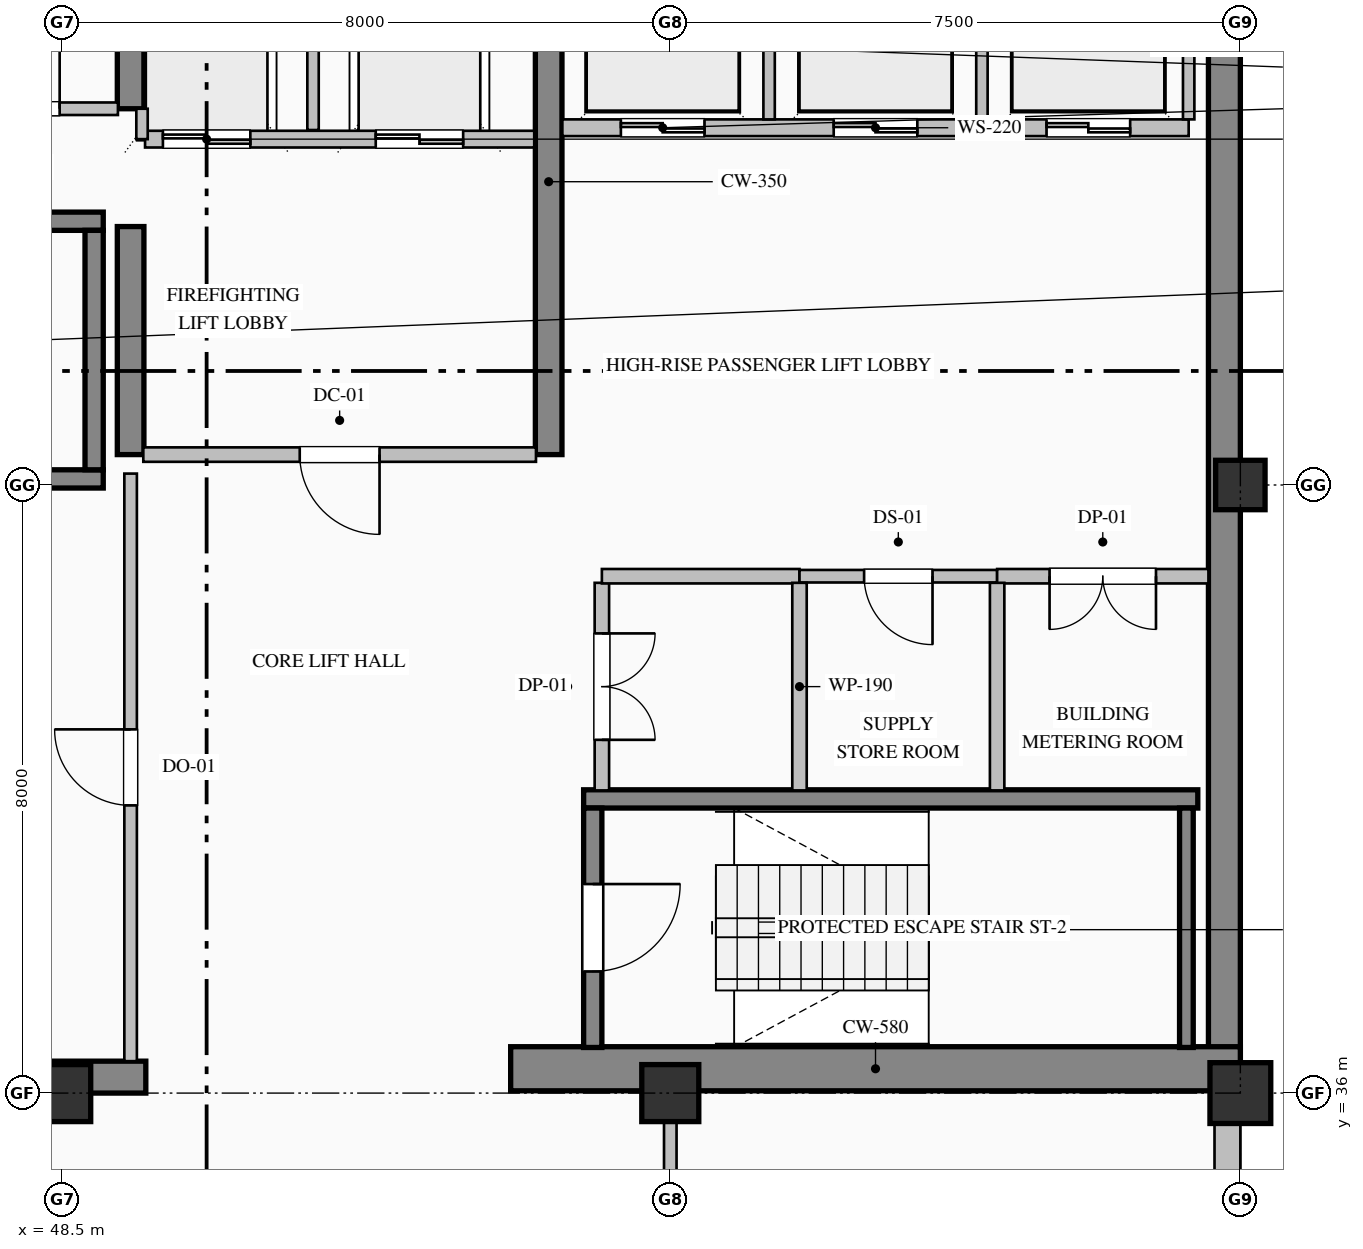
"""IFC4 building model, lengths in metres.
Left out: names, types, materials, properties, quantities, classifications, styles, units other than length and angle.
Written with IfcOpenShell. Run it as: python <this file> out.ifc"""

import sys

from ifc_helpers import new_model, si_unit, direction, frame, frame_2d, origin, origin_2d, place, context, subcontext, project, spatial, rectangle, hollow_rectangle, extrude, element, fill, save


model = new_model("IFC4")
c1 = context("Model", 3, precision=1e-05, world=origin(), true_north=direction((0.0, 1.0)))
c2 = subcontext(c1, "Body", "Model", "MODEL_VIEW")
j1 = project(units=[si_unit("LENGTHUNIT", "METRE"), si_unit("PLANEANGLEUNIT", "RADIAN")], contexts=[c1])
p1 = place(None, origin())
s1 = spatial("IfcSite", under=j1, at=p1, CompositionType="ELEMENT")
p2 = place(p1, origin())
s2 = spatial("IfcBuilding", under=s1, at=p2, CompositionType="ELEMENT")
p3 = place(p2, frame((0.0, 0.0, 339.2)))
s3 = spatial("IfcBuildingStorey", under=s2, at=p3, CompositionType="ELEMENT", Elevation=339.2)
p4 = place(p3, frame((63.79, 36.32, 0.0), z_axis=(0.0, 0.0, 1.0), x_axis=(0.0, 1.0, 0.0)))
e1 = element("IfcWall", 1, at=p4, inside=s3, PredefinedType="SHEAR", context=c2, shape_type="SweptSolid", body=[
    extrude(rectangle(XDim=15.26, YDim=0.42, at=frame_2d((7.63, 0.0))), origin(), (0.0, 0.0, 1.0), 3.785),
])
p5 = place(p3, frame((40.5, 36.21, 0.0), z_axis=(0.0, 0.0, 1.0), x_axis=(1.0, 0.0, 0.0)))
e2 = element("IfcWall", 2, at=p5, inside=s3, PredefinedType="SHEAR", context=c2, shape_type="SweptSolid", body=[
    extrude(rectangle(XDim=9.1, YDim=0.42, at=frame_2d((4.55, 0.0))), origin(), (0.0, 0.0, 1.0), 3.785),
])
p6 = place(p3, frame((54.4, 36.32, 0.0), z_axis=(0.0, 0.0, 1.0), x_axis=(1.0, 0.0, 0.0)))
e3 = element("IfcWall", 3, at=p6, inside=s3, PredefinedType="SHEAR", context=c2, shape_type="SweptSolid", body=[
    extrude(rectangle(XDim=9.6, YDim=0.58, at=frame_2d((4.8, 0.0))), origin(), (0.0, 0.0, 1.0), 4.0),
])
p7 = place(p3, frame((49.4, 44.4, 0.0), z_axis=(0.0, 0.0, 1.0), x_axis=(0.0, 1.0, 0.0)))
e4 = element("IfcWall", 4, at=p7, inside=s3, PredefinedType="SHEAR", context=c2, shape_type="SweptSolid", body=[
    extrude(rectangle(XDim=3.0, YDim=0.35, at=frame_2d((1.5, 0.0))), origin(), (0.0, 0.0, 1.0), 3.785),
])
p8 = place(p3, frame((49.4, 48.95, 0.0), z_axis=(0.0, 0.0, 1.0), x_axis=(0.0, 1.0, 0.0)))
e5 = element("IfcWall", 5, at=p8, inside=s3, PredefinedType="SHEAR", context=c2, shape_type="SweptSolid", body=[
    extrude(rectangle(XDim=2.63, YDim=0.35, at=frame_2d((1.315, 0.0))), origin(), (0.0, 0.0, 1.0), 3.785),
])
p9 = place(p3, frame((54.9, 44.4, 0.0), z_axis=(0.0, 0.0, 1.0), x_axis=(0.0, 1.0, 0.0)))
e6 = element("IfcWall", 6, at=p9, inside=s3, PredefinedType="SHEAR", context=c2, shape_type="SweptSolid", body=[
    extrude(rectangle(XDim=7.18, YDim=0.35, at=frame_2d((3.59, 0.0))), origin(), (0.0, 0.0, 1.0), 3.785),
])
for number, where, z_axis, x_axis in (
    (7, (48.5, 36.0, 0.0), (0.0, 0.0, 1.0), (1.0, 0.0, 0.0)),
    (8, (56.5, 36.0, 0.0), (0.0, 0.0, 1.0), (1.0, 0.0, 0.0)),
):
    element("IfcColumn", number, at=place(p3, frame(where, z_axis=z_axis, x_axis=x_axis)), inside=s3, PredefinedType="COLUMN", context=c2, shape_type="SweptSolid", body=[
        extrude(rectangle(XDim=0.75, YDim=0.75, at=origin_2d()), origin(), (0.0, 0.0, 1.0), 4.0),
    ])
p10 = place(p3, frame((64.0, 36.0, 0.0), z_axis=(0.0, 0.0, 1.0), x_axis=(1.0, 0.0, 0.0)))
e9 = element("IfcColumn", 9, at=p10, inside=s3, PredefinedType="COLUMN", context=c2, shape_type="SweptSolid", body=[
    extrude(hollow_rectangle(XDim=0.8, YDim=0.8, WallThickness=0.032, at=origin_2d()), origin(), (0.0, 0.0, 1.0), 4.0),
])
p11 = place(p3, frame((64.0, 44.0, 0.0), z_axis=(0.0, 0.0, 1.0), x_axis=(1.0, 0.0, 0.0)))
e10 = element("IfcColumn", 10, at=p11, inside=s3, PredefinedType="COLUMN", context=c2, shape_type="SweptSolid", body=[
    extrude(hollow_rectangle(XDim=0.65, YDim=0.65, WallThickness=0.028, at=origin_2d()), origin(), (0.0, 0.0, 1.0), 4.0),
])
p12 = place(p3, frame((63.83, 36.05, 0.0), z_axis=(0.0, 0.0, 1.0), x_axis=(0.0, -1.0, 0.0)))
e11 = element("IfcWall", 11, at=p12, inside=s3, PredefinedType="SOLIDWALL", context=c2, shape_type="SweptSolid", body=[
    extrude(rectangle(XDim=13.55, YDim=0.34, at=frame_2d((6.775, 0.0))), origin(), (0.0, 0.0, 1.0), 3.335),
])
p13 = place(p12, frame((3.075, 0.0, 0.8)))
e12 = element("IfcOpeningElement", 12, at=p13, cuts=e11, PredefinedType="OPENING", context=c2, shape_type="SweptSolid", body=[
    extrude(rectangle(XDim=1.05, YDim=2.15, at=frame_2d((0.525, 1.075))), frame((0.0, 0.18, 0.0), z_axis=(0.0, -1.0, 0.0), x_axis=(1.0, 0.0, 0.0)), (0.0, 0.0, 1.0), 0.36),
])
for number, where, z_axis, x_axis in (
    (13, (40.96, 47.47, 0.0), (0.0, 0.0, 1.0), (1.0, 0.0, 0.0)),
    (14, (49.04, 44.08, 0.0), (0.0, 0.0, 1.0), (-1.0, 0.0, 0.0)),
):
    element("IfcWall", number, at=place(p3, frame(where, z_axis=z_axis, x_axis=x_axis)), inside=s3, PredefinedType="SOLIDWALL", context=c2, shape_type="SweptSolid", body=[
        extrude(rectangle(XDim=8.08, YDim=0.24, at=frame_2d((4.04, 0.0))), origin(), (0.0, 0.0, 1.0), 4.0),
    ])
p14 = place(p3, frame((48.92, 44.2, 0.0), z_axis=(0.0, 0.0, 1.0), x_axis=(0.0, 1.0, 0.0)))
e15 = element("IfcWall", 15, at=p14, inside=s3, PredefinedType="SOLIDWALL", context=c2, shape_type="SweptSolid", body=[
    extrude(rectangle(XDim=3.15, YDim=0.24, at=frame_2d((1.575, 0.0))), origin(), (0.0, 0.0, 1.0), 4.0),
])
p15 = place(p3, frame((55.36, 39.87, 0.0), z_axis=(0.0, 0.0, 1.0), x_axis=(1.0, 0.0, 0.0)))
e16 = element("IfcWall", 16, at=p15, inside=s3, PredefinedType="SOLIDWALL", context=c2, shape_type="SweptSolid", body=[
    extrude(rectangle(XDim=8.08, YDim=0.24, at=frame_2d((4.04, 0.0))), origin(), (0.0, 0.0, 1.0), 4.0),
])
p16 = place(p3, frame((55.48, 39.75, 0.0), z_axis=(0.0, 0.0, 1.0), x_axis=(0.0, -1.0, 0.0)))
e17 = element("IfcWall", 17, at=p16, inside=s3, PredefinedType="SOLIDWALL", context=c2, shape_type="SweptSolid", body=[
    extrude(rectangle(XDim=3.15, YDim=0.24, at=frame_2d((1.575, 0.0))), origin(), (0.0, 0.0, 1.0), 4.0),
])
p17 = place(p16, frame((1.0, 0.0, 0.0)))
e18 = element("IfcOpeningElement", 18, at=p17, cuts=e17, PredefinedType="OPENING", context=c2, shape_type="SweptSolid", body=[
    extrude(rectangle(XDim=1.15, YDim=2.2, at=frame_2d((0.575, 1.1))), frame((0.0, 0.13, 0.0), z_axis=(0.0, -1.0, 0.0), x_axis=(1.0, 0.0, 0.0)), (0.0, 0.0, 1.0), 0.26),
])
p18 = place(p3, frame((63.29, 36.6, 0.0), z_axis=(0.0, 0.0, 1.0), x_axis=(0.0, 1.0, 0.0)))
e19 = element("IfcWall", 19, at=p18, inside=s3, PredefinedType="SOLIDWALL", context=c2, shape_type="SweptSolid", body=[
    extrude(rectangle(XDim=3.15, YDim=0.18, at=frame_2d((1.575, 0.0))), origin(), (0.0, 0.0, 1.0), 4.0),
])
p19 = place(p3, frame((54.71, 48.55, 0.0), z_axis=(0.0, 0.0, 1.0), x_axis=(-1.0, 0.0, 0.0)))
e20 = element("IfcWall", 20, at=p19, inside=s3, PredefinedType="PARTITIONING", context=c2, shape_type="SweptSolid", body=[
    extrude(rectangle(XDim=5.12, YDim=0.22, at=frame_2d((2.56, 0.0))), origin(), (0.0, 0.0, 1.0), 3.785),
])
p20 = place(p19, frame((3.735, 0.0, 0.0)))
e21 = element("IfcOpeningElement", 21, at=p20, cuts=e20, PredefinedType="OPENING", context=c2, shape_type="SweptSolid", body=[
    extrude(rectangle(XDim=1.15, YDim=2.2, at=frame_2d((0.575, 1.1))), frame((0.0, 0.12, 0.0), z_axis=(0.0, -1.0, 0.0), x_axis=(1.0, 0.0, 0.0)), (0.0, 0.0, 1.0), 0.24),
])
p21 = place(p19, frame((0.935, 0.0, 0.0)))
e22 = element("IfcOpeningElement", 22, at=p21, cuts=e20, PredefinedType="OPENING", context=c2, shape_type="SweptSolid", body=[
    extrude(rectangle(XDim=1.15, YDim=2.2, at=frame_2d((0.575, 1.1))), frame((0.0, 0.12, 0.0), z_axis=(0.0, -1.0, 0.0), x_axis=(1.0, 0.0, 0.0)), (0.0, 0.0, 1.0), 0.24),
])
p22 = place(p3, frame((51.8, 48.67, 0.0), z_axis=(0.0, 0.0, 1.0), x_axis=(0.0, 1.0, 0.0)))
e23 = element("IfcWall", 23, at=p22, inside=s3, PredefinedType="PARTITIONING", context=c2, shape_type="SweptSolid", body=[
    extrude(rectangle(XDim=2.91, YDim=0.15, at=frame_2d((1.455, 0.0))), origin(), (0.0, 0.0, 1.0), 3.785),
])
p23 = place(p3, frame((49.55, 48.55, 0.0), z_axis=(0.0, 0.0, 1.0), x_axis=(0.0, 1.0, 0.0)))
e24 = element("IfcWall", 24, at=p23, inside=s3, PredefinedType="PARTITIONING", context=c2, shape_type="SweptSolid", body=[
    extrude(rectangle(XDim=0.4, YDim=0.15, at=frame_2d((0.2, 0.0))), origin(), (0.0, 0.0, 1.0), 3.785),
])
p24 = place(p3, frame((63.32, 48.7, 0.0), z_axis=(0.0, 0.0, 1.0), x_axis=(-1.0, 0.0, 0.0)))
e25 = element("IfcWall", 25, at=p24, inside=s3, PredefinedType="PARTITIONING", context=c2, shape_type="SweptSolid", body=[
    extrude(rectangle(XDim=8.24, YDim=0.22, at=frame_2d((4.12, 0.0))), origin(), (0.0, 0.0, 1.0), 3.785),
])
p25 = place(p24, frame((6.37, 0.0, 0.0)))
e26 = element("IfcOpeningElement", 26, at=p25, cuts=e25, PredefinedType="OPENING", context=c2, shape_type="SweptSolid", body=[
    extrude(rectangle(XDim=1.1, YDim=2.2, at=frame_2d((0.55, 1.1))), frame((0.0, 0.12, 0.0), z_axis=(0.0, -1.0, 0.0), x_axis=(1.0, 0.0, 0.0)), (0.0, 0.0, 1.0), 0.24),
])
p26 = place(p24, frame((3.57, 0.0, 0.0)))
e27 = element("IfcOpeningElement", 27, at=p26, cuts=e25, PredefinedType="OPENING", context=c2, shape_type="SweptSolid", body=[
    extrude(rectangle(XDim=1.1, YDim=2.2, at=frame_2d((0.55, 1.1))), frame((0.0, 0.12, 0.0), z_axis=(0.0, -1.0, 0.0), x_axis=(1.0, 0.0, 0.0)), (0.0, 0.0, 1.0), 0.24),
])
p27 = place(p24, frame((0.77, 0.0, 0.0)))
e28 = element("IfcOpeningElement", 28, at=p27, cuts=e25, PredefinedType="OPENING", context=c2, shape_type="SweptSolid", body=[
    extrude(rectangle(XDim=1.1, YDim=2.2, at=frame_2d((0.55, 1.1))), frame((0.0, 0.12, 0.0), z_axis=(0.0, -1.0, 0.0), x_axis=(1.0, 0.0, 0.0)), (0.0, 0.0, 1.0), 0.24),
])
for number, where, z_axis, x_axis in (
    (29, (57.8, 48.81, 0.0), (0.0, 0.0, 1.0), (0.0, 1.0, 0.0)),
    (30, (60.6, 48.81, 0.0), (0.0, 0.0, 1.0), (0.0, 1.0, 0.0)),
    (31, (63.32, 48.81, 0.0), (0.0, 0.0, 1.0), (0.0, 1.0, 0.0)),
):
    element("IfcWall", number, at=place(p3, frame(where, z_axis=z_axis, x_axis=x_axis)), inside=s3, PredefinedType="PARTITIONING", context=c2, shape_type="SweptSolid", body=[
        extrude(rectangle(XDim=2.77, YDim=0.15, at=frame_2d((1.385, 0.0))), origin(), (0.0, 0.0, 1.0), 3.785),
    ])
p28 = place(p3, frame((46.8, 48.95, 0.0), z_axis=(0.0, 0.0, 1.0), x_axis=(1.0, 0.0, 0.0)))
e32 = element("IfcWall", 32, at=p28, inside=s3, PredefinedType="PARTITIONING", context=c2, shape_type="SweptSolid", body=[
    extrude(rectangle(XDim=2.433, YDim=0.165, at=frame_2d((1.216, 0.0))), origin(), (0.0, 0.0, 1.0), 3.785),
])
p29 = place(p28, frame((0.767, 0.0, 0.0)))
e33 = element("IfcOpeningElement", 33, at=p29, cuts=e32, PredefinedType="OPENING", context=c2, shape_type="SweptSolid", body=[
    extrude(rectangle(XDim=0.9, YDim=2.15, at=frame_2d((0.45, 1.075))), frame((0.0, 0.093, 0.0), z_axis=(0.0, -1.0, 0.0), x_axis=(1.0, 0.0, 0.0)), (0.0, 0.0, 1.0), 0.185),
])
p30 = place(p3, frame((54.733, 44.4, 0.0), z_axis=(0.0, 0.0, 1.0), x_axis=(-1.0, 0.0, 0.0)))
e34 = element("IfcWall", 34, at=p30, inside=s3, PredefinedType="PARTITIONING", context=c2, shape_type="SweptSolid", body=[
    extrude(rectangle(XDim=5.166, YDim=0.19, at=frame_2d((2.583, 0.0))), origin(), (0.0, 0.0, 1.0), 3.785),
])
p31 = place(p30, frame((2.058, 0.0, 0.0)))
e35 = element("IfcOpeningElement", 35, at=p31, cuts=e34, PredefinedType="OPENING", context=c2, shape_type="SweptSolid", body=[
    extrude(rectangle(XDim=1.05, YDim=2.15, at=frame_2d((0.525, 1.075))), frame((0.0, 0.105, 0.0), z_axis=(0.0, -1.0, 0.0), x_axis=(1.0, 0.0, 0.0)), (0.0, 0.0, 1.0), 0.21),
])
p32 = place(p3, frame((49.4, 36.42, 0.0), z_axis=(0.0, 0.0, 1.0), x_axis=(0.0, 1.0, 0.0)))
e36 = element("IfcWall", 36, at=p32, inside=s3, PredefinedType="PARTITIONING", context=c2, shape_type="SweptSolid", body=[
    extrude(rectangle(XDim=7.73, YDim=0.165, at=frame_2d((3.865, 0.0))), origin(), (0.0, 0.0, 1.0), 3.027),
])
p33 = place(p32, frame((3.365, 0.0, 0.0)))
e37 = element("IfcOpeningElement", 37, at=p33, cuts=e36, PredefinedType="OPENING", context=c2, shape_type="SweptSolid", body=[
    extrude(rectangle(XDim=1.0, YDim=2.15, at=frame_2d((0.5, 1.075))), frame((0.0, 0.093, 0.0), z_axis=(0.0, -1.0, 0.0), x_axis=(1.0, 0.0, 0.0)), (0.0, 0.0, 1.0), 0.185),
])
p34 = place(p3, frame((55.6, 42.713, 0.0), z_axis=(0.0, 0.0, 1.0), x_axis=(0.0, -1.0, 0.0)))
e38 = element("IfcWall", 38, at=p34, inside=s3, PredefinedType="PARTITIONING", context=c2, shape_type="SweptSolid", body=[
    extrude(rectangle(XDim=2.731, YDim=0.19, at=frame_2d((1.365, 0.0))), origin(), (0.0, 0.0, 1.0), 3.785),
])
p35 = place(p34, frame((0.666, 0.0, 0.0)))
e39 = element("IfcOpeningElement", 39, at=p35, cuts=e38, PredefinedType="OPENING", context=c2, shape_type="SweptSolid", body=[
    extrude(rectangle(XDim=1.4, YDim=2.25, at=frame_2d((0.7, 1.125))), frame((0.0, 0.105, 0.0), z_axis=(0.0, -1.0, 0.0), x_axis=(1.0, 0.0, 0.0)), (0.0, 0.0, 1.0), 0.21),
])
p36 = place(p3, frame((58.2, 42.8, 0.0), z_axis=(0.0, 0.0, 1.0), x_axis=(-1.0, 0.0, 0.0)))
e40 = element("IfcWall", 40, at=p36, inside=s3, PredefinedType="PARTITIONING", context=c2, shape_type="SweptSolid", body=[
    extrude(rectangle(XDim=2.6, YDim=0.19, at=frame_2d((1.3, 0.0))), origin(), (0.0, 0.0, 1.0), 3.785),
])
p37 = place(p3, frame((60.8, 42.8, 0.0), z_axis=(0.0, 0.0, 1.0), x_axis=(-1.0, 0.0, 0.0)))
e41 = element("IfcWall", 41, at=p37, inside=s3, PredefinedType="PARTITIONING", context=c2, shape_type="SweptSolid", body=[
    extrude(rectangle(XDim=2.6, YDim=0.165, at=frame_2d((1.3, 0.0))), origin(), (0.0, 0.0, 1.0), 3.785),
])
p38 = place(p37, frame((0.85, 0.0, 0.0)))
e42 = element("IfcOpeningElement", 42, at=p38, cuts=e41, PredefinedType="OPENING", context=c2, shape_type="SweptSolid", body=[
    extrude(rectangle(XDim=0.9, YDim=2.15, at=frame_2d((0.45, 1.075))), frame((0.0, 0.093, 0.0), z_axis=(0.0, -1.0, 0.0), x_axis=(1.0, 0.0, 0.0)), (0.0, 0.0, 1.0), 0.185),
])
p39 = place(p3, frame((63.58, 42.8, 0.0), z_axis=(0.0, 0.0, 1.0), x_axis=(-1.0, 0.0, 0.0)))
e43 = element("IfcWall", 43, at=p39, inside=s3, PredefinedType="PARTITIONING", context=c2, shape_type="SweptSolid", body=[
    extrude(rectangle(XDim=2.78, YDim=0.19, at=frame_2d((1.39, 0.0))), origin(), (0.0, 0.0, 1.0), 3.785),
])
p40 = place(p39, frame((0.69, 0.0, 0.0)))
e44 = element("IfcOpeningElement", 44, at=p40, cuts=e43, PredefinedType="OPENING", context=c2, shape_type="SweptSolid", body=[
    extrude(rectangle(XDim=1.4, YDim=2.25, at=frame_2d((0.7, 1.125))), frame((0.0, 0.105, 0.0), z_axis=(0.0, -1.0, 0.0), x_axis=(1.0, 0.0, 0.0)), (0.0, 0.0, 1.0), 0.21),
])
for number, where, z_axis, x_axis in (
    (45, (58.2, 42.713, 0.0), (0.0, 0.0, 1.0), (0.0, -1.0, 0.0)),
    (46, (60.8, 42.713, 0.0), (0.0, 0.0, 1.0), (0.0, -1.0, 0.0)),
):
    element("IfcWall", number, at=place(p3, frame(where, z_axis=z_axis, x_axis=x_axis)), inside=s3, PredefinedType="PARTITIONING", context=c2, shape_type="SweptSolid", body=[
        extrude(rectangle(XDim=2.731, YDim=0.19, at=frame_2d((1.365, 0.0))), origin(), (0.0, 0.0, 1.0), 3.785),
    ])
p41 = place(p3, frame((56.5, 36.0, 0.0), z_axis=(0.0, 0.0, 1.0), x_axis=(0.0, -1.0, 0.0)))
e47 = element("IfcWall", 47, at=p41, inside=s3, PredefinedType="PARTITIONING", context=c2, shape_type="SweptSolid", body=[
    extrude(rectangle(XDim=2.325, YDim=0.165, at=frame_2d((1.163, 0.0))), origin(), (0.0, 0.0, 1.0), 3.177),
])
p42 = place(p17, origin())
e48 = element("IfcDoor", 48, at=p42, inside=s3, OperationType="SINGLE_SWING_LEFT", PredefinedType="DOOR", context=c2, shape_type="SweptSolid", body=[
    extrude(rectangle(XDim=1.15, YDim=2.2, at=frame_2d((0.575, 1.1))), frame((0.0, 0.025, 0.0), z_axis=(0.0, -1.0, 0.0), x_axis=(1.0, 0.0, 0.0)), (0.0, 0.0, 1.0), 0.05),
])
fill(e18, e48)
p43 = place(p20, origin())
e49 = element("IfcDoor", 49, at=p43, inside=s3, OperationType="DOUBLE_DOOR_SLIDING", PredefinedType="DOOR", context=c2, shape_type="SweptSolid", body=[
    extrude(rectangle(XDim=1.15, YDim=2.2, at=frame_2d((0.575, 1.1))), frame((0.0, 0.025, 0.0), z_axis=(0.0, -1.0, 0.0), x_axis=(1.0, 0.0, 0.0)), (0.0, 0.0, 1.0), 0.05),
])
fill(e21, e49)
p44 = place(p21, origin())
e50 = element("IfcDoor", 50, at=p44, inside=s3, OperationType="DOUBLE_DOOR_SLIDING", PredefinedType="DOOR", context=c2, shape_type="SweptSolid", body=[
    extrude(rectangle(XDim=1.15, YDim=2.2, at=frame_2d((0.575, 1.1))), frame((0.0, 0.025, 0.0), z_axis=(0.0, -1.0, 0.0), x_axis=(1.0, 0.0, 0.0)), (0.0, 0.0, 1.0), 0.05),
])
fill(e22, e50)
p45 = place(p25, origin())
e51 = element("IfcDoor", 51, at=p45, inside=s3, OperationType="DOUBLE_DOOR_SLIDING", PredefinedType="DOOR", context=c2, shape_type="SweptSolid", body=[
    extrude(rectangle(XDim=1.1, YDim=2.2, at=frame_2d((0.55, 1.1))), frame((0.0, 0.025, 0.0), z_axis=(0.0, -1.0, 0.0), x_axis=(1.0, 0.0, 0.0)), (0.0, 0.0, 1.0), 0.05),
])
fill(e26, e51)
p46 = place(p26, origin())
e52 = element("IfcDoor", 52, at=p46, inside=s3, OperationType="DOUBLE_DOOR_SLIDING", PredefinedType="DOOR", context=c2, shape_type="SweptSolid", body=[
    extrude(rectangle(XDim=1.1, YDim=2.2, at=frame_2d((0.55, 1.1))), frame((0.0, 0.025, 0.0), z_axis=(0.0, -1.0, 0.0), x_axis=(1.0, 0.0, 0.0)), (0.0, 0.0, 1.0), 0.05),
])
fill(e27, e52)
p47 = place(p27, origin())
e53 = element("IfcDoor", 53, at=p47, inside=s3, OperationType="DOUBLE_DOOR_SLIDING", PredefinedType="DOOR", context=c2, shape_type="SweptSolid", body=[
    extrude(rectangle(XDim=1.1, YDim=2.2, at=frame_2d((0.55, 1.1))), frame((0.0, 0.025, 0.0), z_axis=(0.0, -1.0, 0.0), x_axis=(1.0, 0.0, 0.0)), (0.0, 0.0, 1.0), 0.05),
])
fill(e28, e53)
p48 = place(p31, origin())
e54 = element("IfcDoor", 54, at=p48, inside=s3, OperationType="SINGLE_SWING_LEFT", PredefinedType="DOOR", context=c2, shape_type="SweptSolid", body=[
    extrude(rectangle(XDim=1.05, YDim=2.15, at=frame_2d((0.525, 1.075))), frame((0.0, 0.025, 0.0), z_axis=(0.0, -1.0, 0.0), x_axis=(1.0, 0.0, 0.0)), (0.0, 0.0, 1.0), 0.05),
])
fill(e35, e54)
p49 = place(p33, origin())
e55 = element("IfcDoor", 55, at=p49, inside=s3, OperationType="SINGLE_SWING_RIGHT", PredefinedType="DOOR", context=c2, shape_type="SweptSolid", body=[
    extrude(rectangle(XDim=1.0, YDim=2.15, at=frame_2d((0.5, 1.075))), frame((0.0, 0.025, 0.0), z_axis=(0.0, -1.0, 0.0), x_axis=(1.0, 0.0, 0.0)), (0.0, 0.0, 1.0), 0.05),
])
fill(e37, e55)
p50 = place(p29, origin())
e56 = element("IfcDoor", 56, at=p50, inside=s3, OperationType="SINGLE_SWING_RIGHT", PredefinedType="DOOR", context=c2, shape_type="SweptSolid", body=[
    extrude(rectangle(XDim=0.9, YDim=2.15, at=frame_2d((0.45, 1.075))), frame((0.0, 0.025, 0.0), z_axis=(0.0, -1.0, 0.0), x_axis=(1.0, 0.0, 0.0)), (0.0, 0.0, 1.0), 0.05),
])
fill(e33, e56)
p51 = place(p35, origin())
e57 = element("IfcDoor", 57, at=p51, inside=s3, OperationType="DOUBLE_DOOR_SINGLE_SWING", PredefinedType="DOOR", context=c2, shape_type="SweptSolid", body=[
    extrude(rectangle(XDim=1.4, YDim=2.25, at=frame_2d((0.7, 1.125))), frame((0.0, 0.025, 0.0), z_axis=(0.0, -1.0, 0.0), x_axis=(1.0, 0.0, 0.0)), (0.0, 0.0, 1.0), 0.05),
])
fill(e39, e57)
p52 = place(p38, origin())
e58 = element("IfcDoor", 58, at=p52, inside=s3, OperationType="SINGLE_SWING_LEFT", PredefinedType="DOOR", context=c2, shape_type="SweptSolid", body=[
    extrude(rectangle(XDim=0.9, YDim=2.15, at=frame_2d((0.45, 1.075))), frame((0.0, 0.025, 0.0), z_axis=(0.0, -1.0, 0.0), x_axis=(1.0, 0.0, 0.0)), (0.0, 0.0, 1.0), 0.05),
])
fill(e42, e58)
p53 = place(p40, origin())
e59 = element("IfcDoor", 59, at=p53, inside=s3, OperationType="DOUBLE_DOOR_SINGLE_SWING", PredefinedType="DOOR", context=c2, shape_type="SweptSolid", body=[
    extrude(rectangle(XDim=1.4, YDim=2.25, at=frame_2d((0.7, 1.125))), frame((0.0, 0.025, 0.0), z_axis=(0.0, -1.0, 0.0), x_axis=(1.0, 0.0, 0.0)), (0.0, 0.0, 1.0), 0.05),
])
fill(e44, e59)
save(model, sys.argv[1])
